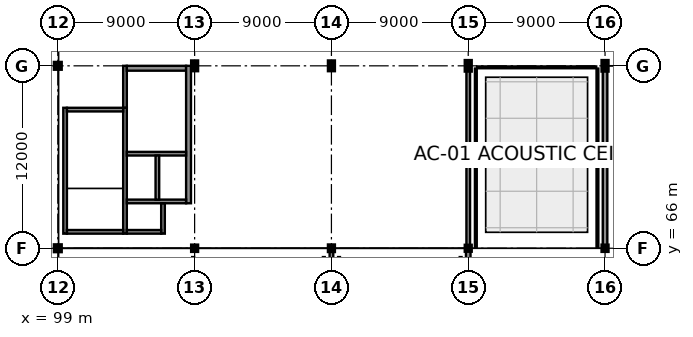
"""IFC4 building model, lengths in metres.
Left out: names, types, materials, properties, quantities, classifications, styles, units other than length and angle.
Written with IfcOpenShell. Run it as: python <this file> out.ifc"""

import sys

from ifc_helpers import new_model, si_unit, direction, frame, frame_2d, origin, origin_2d, place, context, subcontext, project, spatial, rectangle, hollow_circle, i_section, extrude, element, fill, save


model = new_model("IFC4")
c1 = context("Model", 3, precision=1e-05, world=origin(), true_north=direction((0.0, 1.0)))
c2 = subcontext(c1, "Body", "Model", "MODEL_VIEW")
j1 = project(units=[si_unit("LENGTHUNIT", "METRE"), si_unit("PLANEANGLEUNIT", "RADIAN")], contexts=[c1])
p1 = place(None, origin())
s1 = spatial("IfcSite", under=j1, at=p1, CompositionType="ELEMENT")
p2 = place(p1, origin())
s2 = spatial("IfcBuilding", under=s1, at=p2, CompositionType="ELEMENT")
p3 = place(p2, frame((0.0, 0.0, 5.4)))
s3 = spatial("IfcBuildingStorey", under=s2, at=p3, CompositionType="ELEMENT", Elevation=5.4)
for number, where, z_axis, x_axis in (
    (1, (99.0, 66.0, 0.0), (0.0, 0.0, 1.0), (1.0, 0.0, 0.0)),
    (2, (99.0, 78.0, 0.0), (0.0, 0.0, 1.0), (1.0, 0.0, 0.0)),
):
    element("IfcColumn", number, at=place(p3, frame(where, z_axis=z_axis, x_axis=x_axis)), inside=s3, PredefinedType="PILASTER", context=c2, shape_type="SweptSolid", body=[
        extrude(hollow_circle(Radius=0.178, WallThickness=0.016, at=origin_2d()), origin(), (0.0, 0.0, 1.0), 4.5),
    ])
p4 = place(p3, frame((108.0, 66.0, 0.0), z_axis=(0.0, 0.0, 1.0), x_axis=(1.0, 0.0, 0.0)))
e3 = element("IfcColumn", 3, at=p4, inside=s3, PredefinedType="COLUMN", context=c2, shape_type="SweptSolid", body=[
    extrude(i_section(OverallWidth=0.3, OverallDepth=0.32, WebThickness=0.011, FlangeThickness=0.021, at=origin_2d()), origin(), (0.0, 0.0, 1.0), 4.5),
])
p5 = place(p3, frame((108.0, 78.0, 0.0), z_axis=(0.0, 0.0, 1.0), x_axis=(0.0, 1.0, 0.0)))
e4 = element("IfcColumn", 4, at=p5, inside=s3, PredefinedType="COLUMN", context=c2, shape_type="SweptSolid", body=[
    extrude(i_section(OverallWidth=0.3, OverallDepth=0.55, WebThickness=0.015, FlangeThickness=0.029, at=origin_2d()), origin(), (0.0, 0.0, 1.0), 4.5),
])
p6 = place(p3, frame((117.0, 66.0, 0.0), z_axis=(0.0, 0.0, 1.0), x_axis=(1.0, 0.0, 0.0)))
e5 = element("IfcColumn", 5, at=p6, inside=s3, PredefinedType="COLUMN", context=c2, shape_type="SweptSolid", body=[
    extrude(i_section(OverallWidth=0.3, OverallDepth=0.34, WebThickness=0.012, FlangeThickness=0.021, at=origin_2d()), origin(), (0.0, 0.0, 1.0), 4.5),
])
p7 = place(p3, frame((117.0, 78.0, 0.0), z_axis=(0.0, 0.0, 1.0), x_axis=(1.0, 0.0, 0.0)))
e6 = element("IfcColumn", 6, at=p7, inside=s3, PredefinedType="COLUMN", context=c2, shape_type="SweptSolid", body=[
    extrude(i_section(OverallWidth=0.3, OverallDepth=0.55, WebThickness=0.015, FlangeThickness=0.029, at=origin_2d()), origin(), (0.0, 0.0, 1.0), 4.5),
])
p8 = place(p3, frame((126.0, 66.0, 0.0), z_axis=(0.0, 0.0, 1.0), x_axis=(0.0, 1.0, 0.0)))
e7 = element("IfcColumn", 7, at=p8, inside=s3, PredefinedType="COLUMN", context=c2, shape_type="SweptSolid", body=[
    extrude(i_section(OverallWidth=0.3, OverallDepth=0.3, WebThickness=0.011, FlangeThickness=0.019, at=origin_2d()), origin(), (0.0, 0.0, 1.0), 4.5),
])
p9 = place(p3, frame((126.0, 78.0, 0.0), z_axis=(0.0, 0.0, 1.0), x_axis=(1.0, 0.0, 0.0)))
e8 = element("IfcColumn", 8, at=p9, inside=s3, PredefinedType="COLUMN", context=c2, shape_type="SweptSolid", body=[
    extrude(i_section(OverallWidth=0.3, OverallDepth=0.6, WebThickness=0.015, FlangeThickness=0.03, at=origin_2d()), origin(), (0.0, 0.0, 1.0), 4.5),
])
p10 = place(p3, frame((135.0, 66.0, 0.0), z_axis=(0.0, 0.0, 1.0), x_axis=(1.0, 0.0, 0.0)))
e9 = element("IfcColumn", 9, at=p10, inside=s3, PredefinedType="COLUMN", context=c2, shape_type="SweptSolid", body=[
    extrude(i_section(OverallWidth=0.3, OverallDepth=0.32, WebThickness=0.011, FlangeThickness=0.021, at=origin_2d()), origin(), (0.0, 0.0, 1.0), 4.5),
])
p11 = place(p3, frame((135.0, 78.0, 0.0), z_axis=(0.0, 0.0, 1.0), x_axis=(1.0, 0.0, 0.0)))
e10 = element("IfcColumn", 10, at=p11, inside=s3, PredefinedType="COLUMN", context=c2, shape_type="SweptSolid", body=[
    extrude(i_section(OverallWidth=0.3, OverallDepth=0.6, WebThickness=0.015, FlangeThickness=0.03, at=origin_2d()), origin(), (0.0, 0.0, 1.0), 4.5),
])
p12 = place(p3, frame((135.0, 66.158, 0.0), z_axis=(0.0, 0.0, 1.0), x_axis=(0.0, 1.0, 0.0)))
e11 = element("IfcWall", 11, at=p12, inside=s3, PredefinedType="SOLIDWALL", context=c2, shape_type="SweptSolid", body=[
    extrude(rectangle(XDim=11.544, YDim=0.3, at=frame_2d((5.772, 0.0))), origin(), (0.0, 0.0, 1.0), 3.595),
])
p13 = place(p12, frame((2.232, 0.0, 0.8)))
e12 = element("IfcOpeningElement", 12, at=p13, cuts=e11, PredefinedType="OPENING", context=c2, shape_type="SweptSolid", body=[
    extrude(rectangle(XDim=2.0, YDim=2.0, at=frame_2d((1.0, 1.0))), frame((0.0, 0.165, 0.0), z_axis=(0.0, -1.0, 0.0), x_axis=(1.0, 0.0, 0.0)), (0.0, 0.0, 1.0), 0.33),
])
p14 = place(p12, frame((7.312, 0.0, 0.8)))
e13 = element("IfcOpeningElement", 13, at=p14, cuts=e11, PredefinedType="OPENING", context=c2, shape_type="SweptSolid", body=[
    extrude(rectangle(XDim=2.0, YDim=2.0, at=frame_2d((1.0, 1.0))), frame((0.0, 0.165, 0.0), z_axis=(0.0, -1.0, 0.0), x_axis=(1.0, 0.0, 0.0)), (0.0, 0.0, 1.0), 0.33),
])
p15 = place(p3, frame((126.0, 54.148, 0.0), z_axis=(0.0, 0.0, 1.0), x_axis=(0.0, 1.0, 0.0)))
e14 = element("IfcWall", 14, at=p15, inside=s3, PredefinedType="SOLIDWALL", context=c2, shape_type="SweptSolid", body=[
    extrude(rectangle(XDim=11.844, YDim=0.3, at=frame_2d((5.922, 0.0))), origin(), (0.0, 0.0, 1.0), 3.665),
])
p16 = place(p3, frame((99.48, 66.96, 0.0), z_axis=(0.0, 0.0, 1.0), x_axis=(0.0, 1.0, 0.0)))
e15 = element("IfcWall", 15, at=p16, inside=s3, PredefinedType="SHEAR", context=c2, shape_type="SweptSolid", body=[
    extrude(rectangle(XDim=8.28, YDim=0.24, at=frame_2d((4.14, 0.0))), origin(), (0.0, 0.0, 1.0), 4.31),
])
p17 = place(p3, frame((103.42, 66.96, 0.0), z_axis=(0.0, 0.0, 1.0), x_axis=(0.0, 1.0, 0.0)))
e16 = element("IfcWall", 16, at=p17, inside=s3, PredefinedType="SHEAR", context=c2, shape_type="SweptSolid", body=[
    extrude(rectangle(XDim=8.28, YDim=0.24, at=frame_2d((4.14, 0.0))), origin(), (0.0, 0.0, 1.0), 4.31),
])
p18 = place(p17, frame((6.49, 0.0, 0.0)))
e17 = element("IfcOpeningElement", 17, at=p18, cuts=e16, PredefinedType="OPENING", context=c2, shape_type="SweptSolid", body=[
    extrude(rectangle(XDim=1.3, YDim=2.2, at=frame_2d((0.65, 1.1))), frame((0.0, 0.135, 0.0), z_axis=(0.0, -1.0, 0.0), x_axis=(1.0, 0.0, 0.0)), (0.0, 0.0, 1.0), 0.27),
])
for number, where, z_axis, x_axis in (
    (18, (99.6, 67.08, 0.0), (0.0, 0.0, 1.0), (1.0, 0.0, 0.0)),
    (19, (99.6, 75.12, 0.0), (0.0, 0.0, 1.0), (1.0, 0.0, 0.0)),
):
    element("IfcWall", number, at=place(p3, frame(where, z_axis=z_axis, x_axis=x_axis)), inside=s3, PredefinedType="SHEAR", context=c2, shape_type="SweptSolid", body=[
        extrude(rectangle(XDim=3.7, YDim=0.24, at=frame_2d((1.85, 0.0))), origin(), (0.0, 0.0, 1.0), 4.31),
    ])
p19 = place(p3, frame((103.42, 75.24, 0.0), z_axis=(0.0, 0.0, 1.0), x_axis=(0.0, 1.0, 0.0)))
e20 = element("IfcWall", 20, at=p19, inside=s3, PredefinedType="SHEAR", context=c2, shape_type="SweptSolid", body=[
    extrude(rectangle(XDim=2.76, YDim=0.24, at=frame_2d((1.38, 0.0))), origin(), (0.0, 0.0, 1.0), 4.16),
])
p20 = place(p3, frame((103.54, 77.84, 0.0), z_axis=(0.0, 0.0, 1.0), x_axis=(1.0, 0.0, 0.0)))
e21 = element("IfcWall", 21, at=p20, inside=s3, PredefinedType="SHEAR", context=c2, shape_type="SweptSolid", body=[
    extrude(rectangle(XDim=3.9, YDim=0.32, at=frame_2d((1.95, 0.0))), origin(), (0.0, 0.0, 1.0), 4.16),
])
p21 = place(p20, frame((1.225, 0.0, 0.0)))
e22 = element("IfcOpeningElement", 22, at=p21, cuts=e21, PredefinedType="OPENING", context=c2, shape_type="SweptSolid", body=[
    extrude(rectangle(XDim=1.45, YDim=2.2, at=frame_2d((0.725, 1.1))), frame((0.0, 0.175, 0.0), z_axis=(0.0, -1.0, 0.0), x_axis=(1.0, 0.0, 0.0)), (0.0, 0.0, 1.0), 0.35),
])
p22 = place(p3, frame((107.6, 68.96, 0.0), z_axis=(0.0, 0.0, 1.0), x_axis=(0.0, 1.0, 0.0)))
e23 = element("IfcWall", 23, at=p22, inside=s3, PredefinedType="SHEAR", context=c2, shape_type="SweptSolid", body=[
    extrude(rectangle(XDim=9.04, YDim=0.32, at=frame_2d((4.52, 0.0))), origin(), (0.0, 0.0, 1.0), 4.16),
])
p23 = place(p3, frame((103.54, 72.22, 0.0), z_axis=(0.0, 0.0, 1.0), x_axis=(1.0, 0.0, 0.0)))
e24 = element("IfcWall", 24, at=p23, inside=s3, PredefinedType="SHEAR", context=c2, shape_type="SweptSolid", body=[
    extrude(rectangle(XDim=3.9, YDim=0.24, at=frame_2d((1.95, 0.0))), origin(), (0.0, 0.0, 1.0), 4.31),
])
p24 = place(p23, frame((0.385, 0.0, 0.0)))
e25 = element("IfcOpeningElement", 25, at=p24, cuts=e24, PredefinedType="OPENING", context=c2, shape_type="SweptSolid", body=[
    extrude(rectangle(XDim=1.3, YDim=2.2, at=frame_2d((0.65, 1.1))), frame((0.0, 0.135, 0.0), z_axis=(0.0, -1.0, 0.0), x_axis=(1.0, 0.0, 0.0)), (0.0, 0.0, 1.0), 0.27),
])
p25 = place(p23, frame((2.335, 0.0, 0.0)))
e26 = element("IfcOpeningElement", 26, at=p25, cuts=e24, PredefinedType="OPENING", context=c2, shape_type="SweptSolid", body=[
    extrude(rectangle(XDim=1.3, YDim=2.2, at=frame_2d((0.65, 1.1))), frame((0.0, 0.135, 0.0), z_axis=(0.0, -1.0, 0.0), x_axis=(1.0, 0.0, 0.0)), (0.0, 0.0, 1.0), 0.27),
])
p26 = place(p3, frame((103.54, 69.08, 0.0), z_axis=(0.0, 0.0, 1.0), x_axis=(1.0, 0.0, 0.0)))
e27 = element("IfcWall", 27, at=p26, inside=s3, PredefinedType="SHEAR", context=c2, shape_type="SweptSolid", body=[
    extrude(rectangle(XDim=3.9, YDim=0.24, at=frame_2d((1.95, 0.0))), origin(), (0.0, 0.0, 1.0), 4.31),
])
p27 = place(p3, frame((105.55, 69.2, 0.0), z_axis=(0.0, 0.0, 1.0), x_axis=(0.0, 1.0, 0.0)))
e28 = element("IfcWall", 28, at=p27, inside=s3, PredefinedType="SHEAR", context=c2, shape_type="SweptSolid", body=[
    extrude(rectangle(XDim=2.9, YDim=0.24, at=frame_2d((1.45, 0.0))), origin(), (0.0, 0.0, 1.0), 4.31),
])
p28 = place(p3, frame((105.92, 66.96, 0.0), z_axis=(0.0, 0.0, 1.0), x_axis=(0.0, 1.0, 0.0)))
e29 = element("IfcWall", 29, at=p28, inside=s3, PredefinedType="SHEAR", context=c2, shape_type="SweptSolid", body=[
    extrude(rectangle(XDim=2.0, YDim=0.24, at=frame_2d((1.0, 0.0))), origin(), (0.0, 0.0, 1.0), 4.31),
])
p29 = place(p3, frame((103.54, 67.08, 0.0), z_axis=(0.0, 0.0, 1.0), x_axis=(1.0, 0.0, 0.0)))
e30 = element("IfcWall", 30, at=p29, inside=s3, PredefinedType="SHEAR", context=c2, shape_type="SweptSolid", body=[
    extrude(rectangle(XDim=2.26, YDim=0.24, at=frame_2d((1.13, 0.0))), origin(), (0.0, 0.0, 1.0), 4.31),
])
p30 = place(p3, frame((126.0, 66.008, 0.0), z_axis=(0.0, 0.0, 1.0), x_axis=(0.0, 1.0, 0.0)))
e31 = element("IfcWall", 31, at=p30, inside=s3, PredefinedType="SHEAR", context=c2, shape_type="SweptSolid", body=[
    extrude(rectangle(XDim=11.694, YDim=0.24, at=frame_2d((5.847, 0.0))), origin(), (0.0, 0.0, 1.0), 3.645),
])
p31 = place(p3, frame((117.0, 54.138, 0.0), z_axis=(0.0, 0.0, 1.0), x_axis=(0.0, 1.0, 0.0)))
e32 = element("IfcWall", 32, at=p31, inside=s3, PredefinedType="SHEAR", context=c2, shape_type="SweptSolid", body=[
    extrude(rectangle(XDim=11.694, YDim=0.24, at=frame_2d((5.847, 0.0))), origin(), (0.0, 0.0, 1.0), 3.725),
])
for number, where, z_axis, x_axis in (
    (33, (134.5, 77.82, 0.0), (0.0, 0.0, 1.0), (0.0, -1.0, 0.0)),
    (34, (126.5, 66.075, 0.0), (0.0, 0.0, 1.0), (0.0, 1.0, 0.0)),
):
    element("IfcWall", number, at=place(p3, frame(where, z_axis=z_axis, x_axis=x_axis)), inside=s3, PredefinedType="PARTITIONING", context=c2, shape_type="SweptSolid", body=[
        extrude(rectangle(XDim=11.745, YDim=0.12, at=frame_2d((5.873, 0.0))), origin(), (0.0, 0.0, 1.0), 4.14),
    ])
p32 = place(p3, frame((126.58, 77.9, 0.0), z_axis=(0.0, 0.0, 1.0), x_axis=(1.0, 0.0, 0.0)))
e35 = element("IfcWall", 35, at=p32, inside=s3, PredefinedType="PARTITIONING", context=c2, shape_type="SweptSolid", body=[
    extrude(rectangle(XDim=7.84, YDim=0.12, at=frame_2d((3.92, 0.0))), origin(), (0.0, 0.0, 1.0), 3.755),
])
p33 = place(p32, frame((3.47, 0.0, 0.0)))
e36 = element("IfcOpeningElement", 36, at=p33, cuts=e35, PredefinedType="OPENING", context=c2, shape_type="SweptSolid", body=[
    extrude(rectangle(XDim=0.9, YDim=2.1, at=frame_2d((0.45, 1.05))), frame((0.0, 0.075, 0.0), z_axis=(0.0, -1.0, 0.0), x_axis=(1.0, 0.0, 0.0)), (0.0, 0.0, 1.0), 0.15),
])
p34 = place(p3, frame((107.9, 54.58, 0.0), z_axis=(0.0, 0.0, 1.0), x_axis=(0.0, 1.0, 0.0)))
e37 = element("IfcWall", 37, at=p34, inside=s3, PredefinedType="PARTITIONING", context=c2, shape_type="SweptSolid", body=[
    extrude(rectangle(XDim=10.84, YDim=0.12, at=frame_2d((5.42, 0.0))), origin(), (0.0, 0.0, 1.0), 3.775),
])
p35 = place(p34, frame((4.97, 0.0, 0.0)))
e38 = element("IfcOpeningElement", 38, at=p35, cuts=e37, PredefinedType="OPENING", context=c2, shape_type="SweptSolid", body=[
    extrude(rectangle(XDim=0.9, YDim=2.1, at=frame_2d((0.45, 1.05))), frame((0.0, 0.075, 0.0), z_axis=(0.0, -1.0, 0.0), x_axis=(1.0, 0.0, 0.0)), (0.0, 0.0, 1.0), 0.15),
])
for number, where, z_axis, x_axis in (
    (39, (116.5, 65.42, 0.0), (0.0, 0.0, 1.0), (0.0, -1.0, 0.0)),
    (40, (117.5, 54.58, 0.0), (0.0, 0.0, 1.0), (0.0, 1.0, 0.0)),
    (41, (125.5, 65.42, 0.0), (0.0, 0.0, 1.0), (0.0, -1.0, 0.0)),
):
    element("IfcWall", number, at=place(p3, frame(where, z_axis=z_axis, x_axis=x_axis)), inside=s3, PredefinedType="PARTITIONING", context=c2, shape_type="SweptSolid", body=[
        extrude(rectangle(XDim=10.84, YDim=0.12, at=frame_2d((5.42, 0.0))), origin(), (0.0, 0.0, 1.0), 4.14),
    ])
p36 = place(p13, origin())
e42 = element("IfcWindow", 42, at=p36, inside=s3, PartitioningType="SINGLE_PANEL", PredefinedType="WINDOW", context=c2, shape_type="SweptSolid", body=[
    extrude(rectangle(XDim=2.0, YDim=2.0, at=frame_2d((1.0, 1.0))), frame((0.0, 0.03, 0.0), z_axis=(0.0, -1.0, 0.0), x_axis=(1.0, 0.0, 0.0)), (0.0, 0.0, 1.0), 0.06),
])
fill(e12, e42)
p37 = place(p14, origin())
e43 = element("IfcWindow", 43, at=p37, inside=s3, PartitioningType="SINGLE_PANEL", PredefinedType="WINDOW", context=c2, shape_type="SweptSolid", body=[
    extrude(rectangle(XDim=2.0, YDim=2.0, at=frame_2d((1.0, 1.0))), frame((0.0, 0.03, 0.0), z_axis=(0.0, -1.0, 0.0), x_axis=(1.0, 0.0, 0.0)), (0.0, 0.0, 1.0), 0.06),
])
fill(e13, e43)
p38 = place(p18, frame((1.3, 0.0, 0.0), z_axis=(0.0, 0.0, 1.0), x_axis=(-1.0, 0.0, 0.0)))
e44 = element("IfcDoor", 44, at=p38, inside=s3, OperationType="SINGLE_SWING_RIGHT", PredefinedType="DOOR", context=c2, shape_type="SweptSolid", body=[
    extrude(rectangle(XDim=1.3, YDim=2.2, at=frame_2d((0.65, 1.1))), frame((0.0, 0.025, 0.0), z_axis=(0.0, -1.0, 0.0), x_axis=(1.0, 0.0, 0.0)), (0.0, 0.0, 1.0), 0.05),
])
fill(e17, e44)
p39 = place(p21, origin())
e45 = element("IfcDoor", 45, at=p39, inside=s3, OperationType="DOUBLE_DOOR_SINGLE_SWING", PredefinedType="DOOR", context=c2, shape_type="SweptSolid", body=[
    extrude(rectangle(XDim=1.45, YDim=2.2, at=frame_2d((0.725, 1.1))), frame((0.0, 0.025, 0.0), z_axis=(0.0, -1.0, 0.0), x_axis=(1.0, 0.0, 0.0)), (0.0, 0.0, 1.0), 0.05),
])
fill(e22, e45)
p40 = place(p24, origin())
e46 = element("IfcDoor", 46, at=p40, inside=s3, OperationType="DOUBLE_DOOR_SLIDING", PredefinedType="DOOR", context=c2, shape_type="SweptSolid", body=[
    extrude(rectangle(XDim=1.3, YDim=2.2, at=frame_2d((0.65, 1.1))), frame((0.0, 0.025, 0.0), z_axis=(0.0, -1.0, 0.0), x_axis=(1.0, 0.0, 0.0)), (0.0, 0.0, 1.0), 0.05),
])
fill(e25, e46)
p41 = place(p25, origin())
e47 = element("IfcDoor", 47, at=p41, inside=s3, OperationType="DOUBLE_DOOR_SLIDING", PredefinedType="DOOR", context=c2, shape_type="SweptSolid", body=[
    extrude(rectangle(XDim=1.3, YDim=2.2, at=frame_2d((0.65, 1.1))), frame((0.0, 0.025, 0.0), z_axis=(0.0, -1.0, 0.0), x_axis=(1.0, 0.0, 0.0)), (0.0, 0.0, 1.0), 0.05),
])
fill(e26, e47)
p42 = place(p33, frame((0.9, 0.0, 0.0), z_axis=(0.0, 0.0, 1.0), x_axis=(-1.0, 0.0, 0.0)))
e48 = element("IfcDoor", 48, at=p42, inside=s3, OperationType="SINGLE_SWING_RIGHT", PredefinedType="DOOR", context=c2, shape_type="SweptSolid", body=[
    extrude(rectangle(XDim=0.9, YDim=2.1, at=frame_2d((0.45, 1.05))), frame((0.0, 0.025, 0.0), z_axis=(0.0, -1.0, 0.0), x_axis=(1.0, 0.0, 0.0)), (0.0, 0.0, 1.0), 0.05),
])
fill(e36, e48)
save(model, sys.argv[1])
